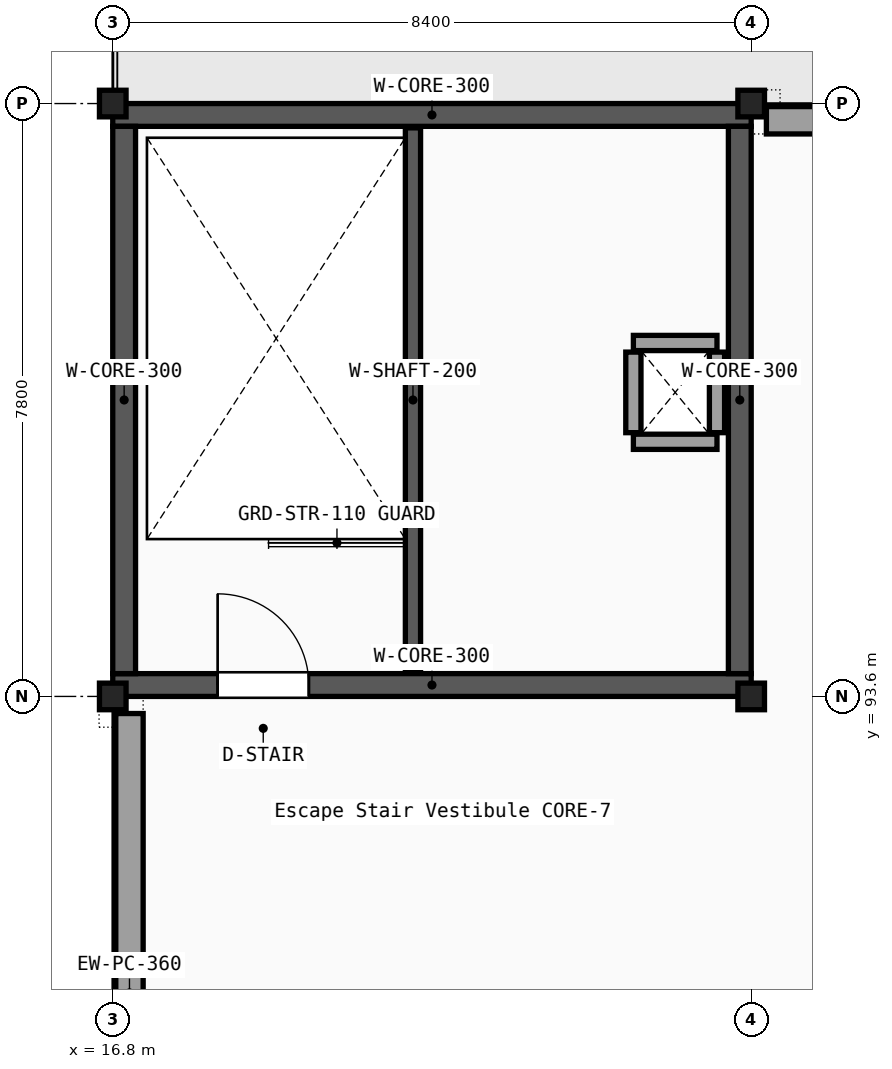
"""IFC4 building model, lengths in metres.
Left out: names, types, materials, properties, quantities, classifications, styles, units other than length and angle.
Written with IfcOpenShell. Run it as: python <this file> out.ifc"""

import sys

from ifc_helpers import new_model, si_unit, direction, frame, frame_2d, origin, origin_2d, place, context, subcontext, project, spatial, rectangle, i_section, extrude, element, fill, save


model = new_model("IFC4")
c1 = context("Model", 3, precision=1e-05, world=origin(), true_north=direction((0.0, 1.0)))
c2 = subcontext(c1, "Body", "Model", "MODEL_VIEW")
j1 = project(units=[si_unit("LENGTHUNIT", "METRE"), si_unit("PLANEANGLEUNIT", "RADIAN")], contexts=[c1])
p1 = place(None, origin())
s1 = spatial("IfcSite", under=j1, at=p1, CompositionType="ELEMENT")
p2 = place(p1, origin())
s2 = spatial("IfcBuilding", under=s1, at=p2, CompositionType="ELEMENT")
p3 = place(p2, frame((0.0, 0.0, 14.85)))
s3 = spatial("IfcBuildingStorey", under=s2, at=p3, CompositionType="ELEMENT", Elevation=14.85)
for number, where, z_axis, x_axis in (
    (1, (16.8, 93.6, 0.0), (0.0, 0.0, 1.0), (1.0, 0.0, 0.0)),
    (2, (16.8, 101.4, 0.0), (0.0, 0.0, 1.0), (1.0, 0.0, 0.0)),
    (3, (25.2, 93.6, 0.0), (0.0, 0.0, 1.0), (1.0, 0.0, 0.0)),
    (4, (25.2, 101.4, 0.0), (0.0, 0.0, 1.0), (1.0, 0.0, 0.0)),
):
    element("IfcColumn", number, at=place(p3, frame(where, z_axis=z_axis, x_axis=x_axis)), inside=s3, PredefinedType="COLUMN", context=c2, shape_type="SweptSolid", body=[
        extrude(i_section(OverallWidth=0.3, OverallDepth=0.35, WebThickness=0.01, FlangeThickness=0.018, FilletRadius=0.027, at=origin_2d()), origin(), (0.0, 0.0, 1.0), 4.05),
    ])
p4 = place(p3, frame((17.02, 86.025, 0.0), z_axis=(0.0, 0.0, 1.0), x_axis=(0.0, 1.0, 0.0)))
e5 = element("IfcWall", 5, at=p4, inside=s3, PredefinedType="SOLIDWALL", context=c2, shape_type="SweptSolid", body=[
    extrude(rectangle(XDim=7.35, YDim=0.36, at=frame_2d((3.675, 0.0))), origin(), (0.0, 0.0, 1.0), 3.44),
])
p5 = place(p3, frame((25.4, 101.18, 0.0), z_axis=(0.0, 0.0, 1.0), x_axis=(1.0, 0.0, 0.0)))
e6 = element("IfcWall", 6, at=p5, inside=s3, PredefinedType="SOLIDWALL", context=c2, shape_type="SweptSolid", body=[
    extrude(rectangle(XDim=8.0, YDim=0.36, at=frame_2d((4.0, 0.0))), origin(), (0.0, 0.0, 1.0), 3.44),
])
p6 = place(p5, frame((3.125, 0.0, 0.75)))
e7 = element("IfcOpeningElement", 7, at=p6, cuts=e6, PredefinedType="OPENING", context=c2, shape_type="SweptSolid", body=[
    extrude(rectangle(XDim=1.75, YDim=1.9, at=frame_2d((0.875, 0.95))), frame((0.0, 0.19, 0.0), z_axis=(0.0, -1.0, 0.0), x_axis=(1.0, 0.0, 0.0)), (0.0, 0.0, 1.0), 0.38),
])
p7 = place(p3, frame((16.8, 93.75, 0.0), z_axis=(0.0, 0.0, 1.0), x_axis=(1.0, 0.0, 0.0)))
e8 = element("IfcWall", 8, at=p7, inside=s3, PredefinedType="SHEAR", context=c2, shape_type="SweptSolid", body=[
    extrude(rectangle(XDim=8.4, YDim=0.3, at=frame_2d((4.2, 0.0))), origin(), (0.0, 0.0, 1.0), 3.8),
])
p8 = place(p7, frame((1.38, 0.0, 0.0)))
e9 = element("IfcOpeningElement", 9, at=p8, cuts=e8, PredefinedType="OPENING", context=c2, shape_type="SweptSolid", body=[
    extrude(rectangle(XDim=1.2, YDim=2.15, at=frame_2d((0.6, 1.075))), frame((0.0, 0.16, 0.0), z_axis=(0.0, -1.0, 0.0), x_axis=(1.0, 0.0, 0.0)), (0.0, 0.0, 1.0), 0.32),
])
p9 = place(p3, frame((16.8, 101.25, 0.0), z_axis=(0.0, 0.0, 1.0), x_axis=(1.0, 0.0, 0.0)))
e10 = element("IfcWall", 10, at=p9, inside=s3, PredefinedType="SHEAR", context=c2, shape_type="SweptSolid", body=[
    extrude(rectangle(XDim=8.4, YDim=0.3, at=frame_2d((4.2, 0.0))), origin(), (0.0, 0.0, 1.0), 3.8),
])
for number, where, z_axis, x_axis in (
    (11, (16.95, 93.9, 0.0), (0.0, 0.0, 1.0), (0.0, 1.0, 0.0)),
    (12, (25.05, 93.9, 0.0), (0.0, 0.0, 1.0), (0.0, 1.0, 0.0)),
):
    element("IfcWall", number, at=place(p3, frame(where, z_axis=z_axis, x_axis=x_axis)), inside=s3, PredefinedType="SHEAR", context=c2, shape_type="SweptSolid", body=[
        extrude(rectangle(XDim=7.2, YDim=0.3, at=frame_2d((3.6, 0.0))), origin(), (0.0, 0.0, 1.0), 3.8),
    ])
p10 = place(p3, frame((20.75, 93.92, 0.0), z_axis=(0.0, 0.0, 1.0), x_axis=(0.0, 1.0, 0.0)))
e13 = element("IfcWall", 13, at=p10, inside=s3, PredefinedType="SHEAR", context=c2, shape_type="SweptSolid", body=[
    extrude(rectangle(XDim=7.16, YDim=0.2, at=frame_2d((3.58, 0.0))), origin(), (0.0, 0.0, 1.0), 3.8),
])
for number, where, z_axis, x_axis in (
    (14, (23.65, 96.95, 0.0), (0.0, 0.0, 1.0), (1.0, 0.0, 0.0)),
    (15, (23.65, 98.25, 0.0), (0.0, 0.0, 1.0), (1.0, 0.0, 0.0)),
):
    element("IfcWall", number, at=place(p3, frame(where, z_axis=z_axis, x_axis=x_axis)), inside=s3, PredefinedType="PARTITIONING", context=c2, shape_type="SweptSolid", body=[
        extrude(rectangle(XDim=1.1, YDim=0.2, at=frame_2d((0.55, 0.0))), origin(), (0.0, 0.0, 1.0), 3.44),
    ])
for number, where, z_axis, x_axis in (
    (16, (23.65, 97.07, 0.0), (0.0, 0.0, 1.0), (0.0, 1.0, 0.0)),
    (17, (24.75, 97.07, 0.0), (0.0, 0.0, 1.0), (0.0, 1.0, 0.0)),
):
    element("IfcWall", number, at=place(p3, frame(where, z_axis=z_axis, x_axis=x_axis)), inside=s3, PredefinedType="PARTITIONING", context=c2, shape_type="SweptSolid", body=[
        extrude(rectangle(XDim=1.06, YDim=0.2, at=frame_2d((0.53, 0.0))), origin(), (0.0, 0.0, 1.0), 3.44),
    ])
p11 = place(p8, origin())
e18 = element("IfcDoor", 18, at=p11, inside=s3, OperationType="SINGLE_SWING_LEFT", PredefinedType="DOOR", context=c2, shape_type="SweptSolid", body=[
    extrude(rectangle(XDim=1.2, YDim=2.15, at=frame_2d((0.6, 1.075))), frame((0.0, 0.025, 0.0), z_axis=(0.0, -1.0, 0.0), x_axis=(1.0, 0.0, 0.0)), (0.0, 0.0, 1.0), 0.05),
])
fill(e9, e18)
save(model, sys.argv[1])
